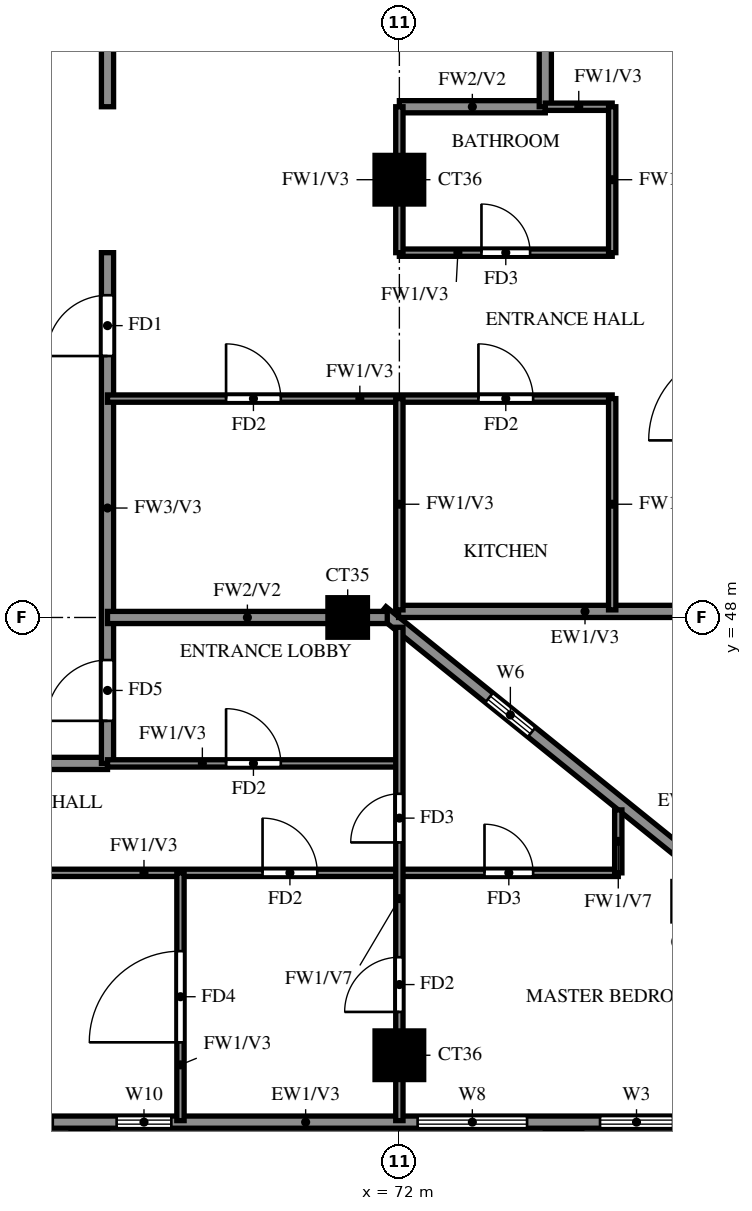
"""IFC4 building model, lengths in metres.
Left out: names, types, materials, properties, quantities, classifications, styles, units other than length and angle.
Written with IfcOpenShell. Run it as: python <this file> out.ifc"""

import sys

from ifc_helpers import new_model, si_unit, direction, frame, frame_2d, origin, origin_2d, place, context, subcontext, project, spatial, rectangle, extrude, source, transform, mapped, element, fill, save


model = new_model("IFC4")
c1 = context("Model", 3, precision=1e-05, world=origin(), true_north=direction((0.0, 1.0)))
c2 = subcontext(c1, "Body", "Model", "MODEL_VIEW")
j1 = project(units=[si_unit("LENGTHUNIT", "METRE"), si_unit("PLANEANGLEUNIT", "RADIAN")], contexts=[c1])
p1 = place(None, origin())
s1 = spatial("IfcSite", under=j1, at=p1, CompositionType="ELEMENT")
p2 = place(p1, origin())
s2 = spatial("IfcBuilding", under=s1, at=p2, CompositionType="ELEMENT")
p3 = place(p2, frame((0.0, 0.0, 246.5)))
s3 = spatial("IfcBuildingStorey", under=s2, at=p3, CompositionType="ELEMENT", Elevation=246.5)
m1 = source(origin(), c2, "Body", "SweptSolid", [
    extrude(rectangle(XDim=0.8, YDim=0.8, at=origin_2d()), origin(), (0.0, 0.0, 1.0), 3.22),
])
p4 = place(p3, frame((72.0, 40.8, 0.0), z_axis=(0.0, 0.0, 1.0), x_axis=(1.0, 0.0, 0.0)))
e1 = element("IfcColumn", 1, at=p4, inside=s3, PredefinedType="COLUMN", context=c2, shape_type="MappedRepresentation", body=[
    mapped(m1, transform((0.0, 0.0, 0.0))),
])
m2 = source(origin(), c2, "Body", "SweptSolid", [
    extrude(rectangle(XDim=0.65, YDim=0.65, at=origin_2d()), origin(), (0.0, 0.0, 1.0), 3.22),
])
for number, where, z_axis, x_axis in (
    (2, (76.823, 43.333, 0.0), (0.0, 0.0, 1.0), (1.0, 0.0, 0.0)),
    (3, (71.15, 48.0, 0.0), (0.0, 0.0, 1.0), (1.0, 0.0, 0.0)),
):
    element("IfcColumn", number, at=place(p3, frame(where, z_axis=z_axis, x_axis=x_axis)), inside=s3, PredefinedType="COLUMN", context=c2, shape_type="MappedRepresentation", body=[
        mapped(m2, transform((0.0, 0.0, 0.0))),
    ])
p5 = place(p3, frame((72.0, 55.2, 0.0), z_axis=(0.0, 0.0, 1.0), x_axis=(1.0, 0.0, 0.0)))
e4 = element("IfcColumn", 4, at=p5, inside=s3, PredefinedType="COLUMN", context=c2, shape_type="MappedRepresentation", body=[
    mapped(m1, transform((0.0, 0.0, 0.0))),
])
p6 = place(p3, frame((81.907, 39.87, 0.0), z_axis=(0.0, 0.0, 1.0), x_axis=(-0.777936274417, 0.62834318087, 0.0)))
e5 = element("IfcWall", 5, at=p6, inside=s3, PredefinedType="SOLIDWALL", context=c2, shape_type="SweptSolid", body=[
    extrude(rectangle(XDim=13.099, YDim=0.2, at=frame_2d((6.549, 0.0))), origin(), (0.0, 0.0, 1.0), 3.22),
])
p7 = place(p6, frame((9.938, 0.0, 1.5)))
e6 = element("IfcOpeningElement", 6, at=p7, cuts=e5, PredefinedType="OPENING", context=c2, shape_type="SweptSolid", body=[
    extrude(rectangle(XDim=0.9, YDim=0.9, at=frame_2d((0.45, 0.45))), frame((0.0, 0.11, 0.0), z_axis=(0.0, -1.0, 0.0), x_axis=(1.0, 0.0, 0.0)), (0.0, 0.0, 1.0), 0.22),
])
p8 = place(p3, frame((71.987, 48.1, 0.0), z_axis=(0.0, 0.0, 1.0), x_axis=(1.0, 0.0, 0.0)))
e7 = element("IfcWall", 7, at=p8, inside=s3, PredefinedType="SOLIDWALL", context=c2, shape_type="SweptSolid", body=[
    extrude(rectangle(XDim=6.813, YDim=0.2, at=frame_2d((3.406, 0.0))), origin(), (0.0, 0.0, 1.0), 3.22),
])
p9 = place(p3, frame((58.8, 39.7, 0.0), z_axis=(0.0, 0.0, 1.0), x_axis=(1.0, 0.0, 0.0)))
e8 = element("IfcWall", 8, at=p9, inside=s3, PredefinedType="SOLIDWALL", context=c2, shape_type="SweptSolid", body=[
    extrude(rectangle(XDim=23.317, YDim=0.2, at=frame_2d((11.658, 0.0))), origin(), (0.0, 0.0, 1.0), 3.22),
])
p10 = place(p9, frame((3.3, 0.0, 0.0)))
e9 = element("IfcOpeningElement", 9, at=p10, cuts=e8, PredefinedType="OPENING", context=c2, shape_type="SweptSolid", body=[
    extrude(rectangle(XDim=1.8, YDim=2.4, at=frame_2d((0.9, 1.2))), frame((0.0, 0.11, 0.0), z_axis=(0.0, -1.0, 0.0), x_axis=(1.0, 0.0, 0.0)), (0.0, 0.0, 1.0), 0.22),
])
p11 = place(p9, frame((18.3, 0.0, 0.0)))
e10 = element("IfcOpeningElement", 10, at=p11, cuts=e8, PredefinedType="OPENING", context=c2, shape_type="SweptSolid", body=[
    extrude(rectangle(XDim=1.8, YDim=2.4, at=frame_2d((0.9, 1.2))), frame((0.0, 0.11, 0.0), z_axis=(0.0, -1.0, 0.0), x_axis=(1.0, 0.0, 0.0)), (0.0, 0.0, 1.0), 0.22),
])
p12 = place(p9, frame((1.95, 0.0, 0.6)))
e11 = element("IfcOpeningElement", 11, at=p12, cuts=e8, PredefinedType="OPENING", context=c2, shape_type="SweptSolid", body=[
    extrude(rectangle(XDim=0.9, YDim=2.4, at=frame_2d((0.45, 1.2))), frame((0.0, 0.11, 0.0), z_axis=(0.0, -1.0, 0.0), x_axis=(1.0, 0.0, 0.0)), (0.0, 0.0, 1.0), 0.22),
])
p13 = place(p9, frame((5.7, 0.0, 0.6)))
e12 = element("IfcOpeningElement", 12, at=p13, cuts=e8, PredefinedType="OPENING", context=c2, shape_type="SweptSolid", body=[
    extrude(rectangle(XDim=1.8, YDim=2.4, at=frame_2d((0.9, 1.2))), frame((0.0, 0.11, 0.0), z_axis=(0.0, -1.0, 0.0), x_axis=(1.0, 0.0, 0.0)), (0.0, 0.0, 1.0), 0.22),
])
p14 = place(p9, frame((8.55, 0.0, 0.6)))
e13 = element("IfcOpeningElement", 13, at=p14, cuts=e8, PredefinedType="OPENING", context=c2, shape_type="SweptSolid", body=[
    extrude(rectangle(XDim=0.9, YDim=2.4, at=frame_2d((0.45, 1.2))), frame((0.0, 0.11, 0.0), z_axis=(0.0, -1.0, 0.0), x_axis=(1.0, 0.0, 0.0)), (0.0, 0.0, 1.0), 0.22),
])
p15 = place(p9, frame((13.5, 0.0, 0.6)))
e14 = element("IfcOpeningElement", 14, at=p15, cuts=e8, PredefinedType="OPENING", context=c2, shape_type="SweptSolid", body=[
    extrude(rectangle(XDim=1.8, YDim=2.4, at=frame_2d((0.9, 1.2))), frame((0.0, 0.11, 0.0), z_axis=(0.0, -1.0, 0.0), x_axis=(1.0, 0.0, 0.0)), (0.0, 0.0, 1.0), 0.22),
])
p16 = place(p9, frame((16.5, 0.0, 0.6)))
e15 = element("IfcOpeningElement", 15, at=p16, cuts=e8, PredefinedType="OPENING", context=c2, shape_type="SweptSolid", body=[
    extrude(rectangle(XDim=1.2, YDim=2.4, at=frame_2d((0.6, 1.2))), frame((0.0, 0.11, 0.0), z_axis=(0.0, -1.0, 0.0), x_axis=(1.0, 0.0, 0.0)), (0.0, 0.0, 1.0), 0.22),
])
p17 = place(p9, frame((20.7, 0.0, 0.6)))
e16 = element("IfcOpeningElement", 16, at=p17, cuts=e8, PredefinedType="OPENING", context=c2, shape_type="SweptSolid", body=[
    extrude(rectangle(XDim=1.2, YDim=2.4, at=frame_2d((0.6, 1.2))), frame((0.0, 0.11, 0.0), z_axis=(0.0, -1.0, 0.0), x_axis=(1.0, 0.0, 0.0)), (0.0, 0.0, 1.0), 0.22),
])
p18 = place(p3, frame((60.0, 45.6, 0.0), z_axis=(0.0, 0.0, 1.0), x_axis=(1.0, 0.0, 0.0)))
e17 = element("IfcWall", 17, at=p18, inside=s3, PredefinedType="SOLIDWALL", context=c2, shape_type="SweptSolid", body=[
    extrude(rectangle(XDim=7.2, YDim=0.2, at=frame_2d((3.6, 0.0))), origin(), (0.0, 0.0, 1.0), 3.22),
])
p19 = place(p3, frame((67.2, 45.6, 0.0), z_axis=(0.0, 0.0, 1.0), x_axis=(0.0, 1.0, 0.0)))
e18 = element("IfcWall", 18, at=p19, inside=s3, PredefinedType="SOLIDWALL", context=c2, shape_type="SweptSolid", body=[
    extrude(rectangle(XDim=8.4, YDim=0.2, at=frame_2d((4.2, 0.0))), origin(), (0.0, 0.0, 1.0), 3.22),
])
p20 = place(p19, frame((6.7, 0.0, 0.0)))
e19 = element("IfcOpeningElement", 19, at=p20, cuts=e18, PredefinedType="OPENING", context=c2, shape_type="SweptSolid", body=[
    extrude(rectangle(XDim=1.0, YDim=2.1, at=frame_2d((0.5, 1.05))), frame((0.0, 0.11, 0.0), z_axis=(0.0, -1.0, 0.0), x_axis=(1.0, 0.0, 0.0)), (0.0, 0.0, 1.0), 0.22),
])
p21 = place(p19, frame((0.7, 0.0, 0.0)))
e20 = element("IfcOpeningElement", 20, at=p21, cuts=e18, PredefinedType="OPENING", context=c2, shape_type="SweptSolid", body=[
    extrude(rectangle(XDim=1.0, YDim=2.1, at=frame_2d((0.5, 1.05))), frame((0.0, 0.11, 0.0), z_axis=(0.0, -1.0, 0.0), x_axis=(1.0, 0.0, 0.0)), (0.0, 0.0, 1.0), 0.22),
])
p22 = place(p3, frame((67.2, 56.4, 0.0), z_axis=(0.0, 0.0, 1.0), x_axis=(0.0, 1.0, 0.0)))
e21 = element("IfcWall", 21, at=p22, inside=s3, PredefinedType="SOLIDWALL", context=c2, shape_type="SweptSolid", body=[
    extrude(rectangle(XDim=6.0, YDim=0.2, at=frame_2d((3.0, 0.0))), origin(), (0.0, 0.0, 1.0), 3.22),
])
p23 = place(p22, frame((3.7, 0.0, 0.0)))
e22 = element("IfcOpeningElement", 22, at=p23, cuts=e21, PredefinedType="OPENING", context=c2, shape_type="SweptSolid", body=[
    extrude(rectangle(XDim=1.0, YDim=2.1, at=frame_2d((0.5, 1.05))), frame((0.0, 0.11, 0.0), z_axis=(0.0, -1.0, 0.0), x_axis=(1.0, 0.0, 0.0)), (0.0, 0.0, 1.0), 0.22),
])
p24 = place(p3, frame((67.2, 48.0, 0.0), z_axis=(0.0, 0.0, 1.0), x_axis=(1.0, 0.0, 0.0)))
e23 = element("IfcWall", 23, at=p24, inside=s3, PredefinedType="SOLIDWALL", context=c2, shape_type="SweptSolid", body=[
    extrude(rectangle(XDim=4.601, YDim=0.2, at=frame_2d((2.301, 0.0))), origin(), (0.0, 0.0, 1.0), 3.22),
])
p25 = place(p3, frame((72.0, 56.4, 0.0), z_axis=(0.0, 0.0, 1.0), x_axis=(1.0, 0.0, 0.0)))
e24 = element("IfcWall", 24, at=p25, inside=s3, PredefinedType="SOLIDWALL", context=c2, shape_type="SweptSolid", body=[
    extrude(rectangle(XDim=2.4, YDim=0.2, at=frame_2d((1.2, 0.0))), origin(), (0.0, 0.0, 1.0), 3.22),
])
p26 = place(p3, frame((74.4, 56.4, 0.0), z_axis=(0.0, 0.0, 1.0), x_axis=(0.0, 1.0, 0.0)))
e25 = element("IfcWall", 25, at=p26, inside=s3, PredefinedType="SOLIDWALL", context=c2, shape_type="SweptSolid", body=[
    extrude(rectangle(XDim=2.4, YDim=0.2, at=frame_2d((1.2, 0.0))), origin(), (0.0, 0.0, 1.0), 3.22),
])
p27 = place(p3, frame((60.0, 43.8, 0.0), z_axis=(0.0, 0.0, 1.0), x_axis=(1.0, 0.0, 0.0)))
e26 = element("IfcWall", 26, at=p27, inside=s3, PredefinedType="PARTITIONING", context=c2, shape_type="SweptSolid", body=[
    extrude(rectangle(XDim=15.6, YDim=0.12, at=frame_2d((7.8, 0.0))), origin(), (0.0, 0.0, 1.0), 3.22),
])
p28 = place(p27, frame((9.75, 0.0, 0.0)))
e27 = element("IfcOpeningElement", 27, at=p28, cuts=e26, PredefinedType="OPENING", context=c2, shape_type="SweptSolid", body=[
    extrude(rectangle(XDim=0.9, YDim=2.1, at=frame_2d((0.45, 1.05))), frame((0.0, 0.07, 0.0), z_axis=(0.0, -1.0, 0.0), x_axis=(1.0, 0.0, 0.0)), (0.0, 0.0, 1.0), 0.14),
])
p29 = place(p27, frame((3.45, 0.0, 0.0)))
e28 = element("IfcOpeningElement", 28, at=p29, cuts=e26, PredefinedType="OPENING", context=c2, shape_type="SweptSolid", body=[
    extrude(rectangle(XDim=1.5, YDim=2.1, at=frame_2d((0.75, 1.05))), frame((0.0, 0.07, 0.0), z_axis=(0.0, -1.0, 0.0), x_axis=(1.0, 0.0, 0.0)), (0.0, 0.0, 1.0), 0.14),
])
p30 = place(p27, frame((13.4, 0.0, 0.0)))
e29 = element("IfcOpeningElement", 29, at=p30, cuts=e26, PredefinedType="OPENING", context=c2, shape_type="SweptSolid", body=[
    extrude(rectangle(XDim=0.8, YDim=2.1, at=frame_2d((0.4, 1.05))), frame((0.0, 0.07, 0.0), z_axis=(0.0, -1.0, 0.0), x_axis=(1.0, 0.0, 0.0)), (0.0, 0.0, 1.0), 0.14),
])
p31 = place(p3, frame((67.2, 45.6, 0.0), z_axis=(0.0, 0.0, 1.0), x_axis=(1.0, 0.0, 0.0)))
e30 = element("IfcWall", 30, at=p31, inside=s3, PredefinedType="PARTITIONING", context=c2, shape_type="SweptSolid", body=[
    extrude(rectangle(XDim=4.8, YDim=0.12, at=frame_2d((2.4, 0.0))), origin(), (0.0, 0.0, 1.0), 3.22),
])
p32 = place(p31, frame((1.95, 0.0, 0.0)))
e31 = element("IfcOpeningElement", 31, at=p32, cuts=e30, PredefinedType="OPENING", context=c2, shape_type="SweptSolid", body=[
    extrude(rectangle(XDim=0.9, YDim=2.1, at=frame_2d((0.45, 1.05))), frame((0.0, 0.07, 0.0), z_axis=(0.0, -1.0, 0.0), x_axis=(1.0, 0.0, 0.0)), (0.0, 0.0, 1.0), 0.14),
])
p33 = place(p3, frame((67.2, 51.6, 0.0), z_axis=(0.0, 0.0, 1.0), x_axis=(1.0, 0.0, 0.0)))
e32 = element("IfcWall", 32, at=p33, inside=s3, PredefinedType="PARTITIONING", context=c2, shape_type="SweptSolid", body=[
    extrude(rectangle(XDim=8.3, YDim=0.12, at=frame_2d((4.15, 0.0))), origin(), (0.0, 0.0, 1.0), 3.22),
])
p34 = place(p33, frame((6.1, 0.0, 0.0)))
e33 = element("IfcOpeningElement", 33, at=p34, cuts=e32, PredefinedType="OPENING", context=c2, shape_type="SweptSolid", body=[
    extrude(rectangle(XDim=0.9, YDim=2.1, at=frame_2d((0.45, 1.05))), frame((0.0, 0.07, 0.0), z_axis=(0.0, -1.0, 0.0), x_axis=(1.0, 0.0, 0.0)), (0.0, 0.0, 1.0), 0.14),
])
p35 = place(p33, frame((1.95, 0.0, 0.0)))
e34 = element("IfcOpeningElement", 34, at=p35, cuts=e32, PredefinedType="OPENING", context=c2, shape_type="SweptSolid", body=[
    extrude(rectangle(XDim=0.9, YDim=2.1, at=frame_2d((0.45, 1.05))), frame((0.0, 0.07, 0.0), z_axis=(0.0, -1.0, 0.0), x_axis=(1.0, 0.0, 0.0)), (0.0, 0.0, 1.0), 0.14),
])
p36 = place(p3, frame((72.0, 54.0, 0.0), z_axis=(0.0, 0.0, 1.0), x_axis=(1.0, 0.0, 0.0)))
e35 = element("IfcWall", 35, at=p36, inside=s3, PredefinedType="PARTITIONING", context=c2, shape_type="SweptSolid", body=[
    extrude(rectangle(XDim=3.5, YDim=0.12, at=frame_2d((1.75, 0.0))), origin(), (0.0, 0.0, 1.0), 3.22),
])
p37 = place(p36, frame((1.35, 0.0, 0.0)))
e36 = element("IfcOpeningElement", 36, at=p37, cuts=e35, PredefinedType="OPENING", context=c2, shape_type="SweptSolid", body=[
    extrude(rectangle(XDim=0.8, YDim=2.1, at=frame_2d((0.4, 1.05))), frame((0.0, 0.07, 0.0), z_axis=(0.0, -1.0, 0.0), x_axis=(1.0, 0.0, 0.0)), (0.0, 0.0, 1.0), 0.14),
])
p38 = place(p3, frame((74.4, 56.4, 0.0), z_axis=(0.0, 0.0, 1.0), x_axis=(1.0, 0.0, 0.0)))
e37 = element("IfcWall", 37, at=p38, inside=s3, PredefinedType="PARTITIONING", context=c2, shape_type="SweptSolid", body=[
    extrude(rectangle(XDim=1.1, YDim=0.12, at=frame_2d((0.55, 0.0))), origin(), (0.0, 0.0, 1.0), 3.22),
])
p39 = place(p3, frame((68.4, 39.725, 0.0), z_axis=(0.0, 0.0, 1.0), x_axis=(0.0, 1.0, 0.0)))
e38 = element("IfcWall", 38, at=p39, inside=s3, PredefinedType="PARTITIONING", context=c2, shape_type="SweptSolid", body=[
    extrude(rectangle(XDim=4.075, YDim=0.12, at=frame_2d((2.038, 0.0))), origin(), (0.0, 0.0, 1.0), 3.22),
])
p40 = place(p39, frame((1.288, 0.0, 0.0)))
e39 = element("IfcOpeningElement", 39, at=p40, cuts=e38, PredefinedType="OPENING", context=c2, shape_type="SweptSolid", body=[
    extrude(rectangle(XDim=1.5, YDim=2.1, at=frame_2d((0.75, 1.05))), frame((0.0, 0.07, 0.0), z_axis=(0.0, -1.0, 0.0), x_axis=(1.0, 0.0, 0.0)), (0.0, 0.0, 1.0), 0.14),
])
p41 = place(p3, frame((72.0, 39.725, 0.0), z_axis=(0.0, 0.0, 1.0), x_axis=(0.0, 1.0, 0.0)))
e40 = element("IfcWall", 40, at=p41, inside=s3, PredefinedType="PARTITIONING", context=c2, shape_type="SweptSolid", body=[
    extrude(rectangle(XDim=8.114, YDim=0.12, at=frame_2d((4.057, 0.0))), origin(), (0.0, 0.0, 1.0), 2.32),
])
p42 = place(p41, frame((1.788, 0.0, 0.0)))
e41 = element("IfcOpeningElement", 41, at=p42, cuts=e40, PredefinedType="OPENING", context=c2, shape_type="SweptSolid", body=[
    extrude(rectangle(XDim=0.9, YDim=2.1, at=frame_2d((0.45, 1.05))), frame((0.0, 0.07, 0.0), z_axis=(0.0, -1.0, 0.0), x_axis=(1.0, 0.0, 0.0)), (0.0, 0.0, 1.0), 0.14),
])
p43 = place(p41, frame((4.575, 0.0, 0.0)))
e42 = element("IfcOpeningElement", 42, at=p43, cuts=e40, PredefinedType="OPENING", context=c2, shape_type="SweptSolid", body=[
    extrude(rectangle(XDim=0.8, YDim=2.1, at=frame_2d((0.4, 1.05))), frame((0.0, 0.07, 0.0), z_axis=(0.0, -1.0, 0.0), x_axis=(1.0, 0.0, 0.0)), (0.0, 0.0, 1.0), 0.14),
])
p44 = place(p3, frame((72.0, 48.125, 0.0), z_axis=(0.0, 0.0, 1.0), x_axis=(0.0, 1.0, 0.0)))
e43 = element("IfcWall", 43, at=p44, inside=s3, PredefinedType="PARTITIONING", context=c2, shape_type="SweptSolid", body=[
    extrude(rectangle(XDim=3.475, YDim=0.12, at=frame_2d((1.738, 0.0))), origin(), (0.0, 0.0, 1.0), 3.22),
])
p45 = place(p3, frame((72.0, 54.0, 0.0), z_axis=(0.0, 0.0, 1.0), x_axis=(0.0, 1.0, 0.0)))
e44 = element("IfcWall", 44, at=p45, inside=s3, PredefinedType="PARTITIONING", context=c2, shape_type="SweptSolid", body=[
    extrude(rectangle(XDim=2.4, YDim=0.12, at=frame_2d((1.2, 0.0))), origin(), (0.0, 0.0, 1.0), 3.22),
])
p46 = place(p3, frame((75.5, 48.125, 0.0), z_axis=(0.0, 0.0, 1.0), x_axis=(0.0, 1.0, 0.0)))
e45 = element("IfcWall", 45, at=p46, inside=s3, PredefinedType="PARTITIONING", context=c2, shape_type="SweptSolid", body=[
    extrude(rectangle(XDim=3.475, YDim=0.12, at=frame_2d((1.738, 0.0))), origin(), (0.0, 0.0, 1.0), 3.22),
])
p47 = place(p3, frame((75.5, 54.0, 0.0), z_axis=(0.0, 0.0, 1.0), x_axis=(0.0, 1.0, 0.0)))
e46 = element("IfcWall", 46, at=p47, inside=s3, PredefinedType="PARTITIONING", context=c2, shape_type="SweptSolid", body=[
    extrude(rectangle(XDim=2.4, YDim=0.12, at=frame_2d((1.2, 0.0))), origin(), (0.0, 0.0, 1.0), 3.22),
])
p48 = place(p3, frame((75.6, 43.8, 0.0), z_axis=(0.0, 0.0, 1.0), x_axis=(0.0, 1.0, 0.0)))
e47 = element("IfcWall", 47, at=p48, inside=s3, PredefinedType="PARTITIONING", context=c2, shape_type="SweptSolid", body=[
    extrude(rectangle(XDim=1.035, YDim=0.12, at=frame_2d((0.518, 0.0))), origin(), (0.0, 0.0, 1.0), 2.32),
])
p49 = place(p7, origin())
e48 = element("IfcWindow", 48, at=p49, inside=s3, PartitioningType="SINGLE_PANEL", PredefinedType="WINDOW", context=c2, shape_type="SweptSolid", body=[
    extrude(rectangle(XDim=0.9, YDim=0.9, at=frame_2d((0.45, 0.45))), frame((0.0, 0.03, 0.0), z_axis=(0.0, -1.0, 0.0), x_axis=(1.0, 0.0, 0.0)), (0.0, 0.0, 1.0), 0.06),
])
fill(e6, e48)
p50 = place(p14, origin())
e49 = element("IfcWindow", 49, at=p50, inside=s3, PartitioningType="SINGLE_PANEL", PredefinedType="WINDOW", context=c2, shape_type="SweptSolid", body=[
    extrude(rectangle(XDim=0.9, YDim=2.4, at=frame_2d((0.45, 1.2))), frame((0.0, 0.03, 0.0), z_axis=(0.0, -1.0, 0.0), x_axis=(1.0, 0.0, 0.0)), (0.0, 0.0, 1.0), 0.06),
])
fill(e13, e49)
p51 = place(p15, origin())
e50 = element("IfcWindow", 50, at=p51, inside=s3, PartitioningType="DOUBLE_PANEL_VERTICAL", PredefinedType="WINDOW", context=c2, shape_type="SweptSolid", body=[
    extrude(rectangle(XDim=1.8, YDim=2.4, at=frame_2d((0.9, 1.2))), frame((0.0, 0.03, 0.0), z_axis=(0.0, -1.0, 0.0), x_axis=(1.0, 0.0, 0.0)), (0.0, 0.0, 1.0), 0.06),
])
fill(e14, e50)
p52 = place(p16, origin())
e51 = element("IfcWindow", 51, at=p52, inside=s3, PartitioningType="SINGLE_PANEL", PredefinedType="WINDOW", context=c2, shape_type="SweptSolid", body=[
    extrude(rectangle(XDim=1.2, YDim=2.4, at=frame_2d((0.6, 1.2))), frame((0.0, 0.03, 0.0), z_axis=(0.0, -1.0, 0.0), x_axis=(1.0, 0.0, 0.0)), (0.0, 0.0, 1.0), 0.06),
])
fill(e15, e51)
p53 = place(p20, origin())
e52 = element("IfcDoor", 52, at=p53, inside=s3, OperationType="SINGLE_SWING_LEFT", PredefinedType="DOOR", context=c2, shape_type="SweptSolid", body=[
    extrude(rectangle(XDim=1.0, YDim=2.1, at=frame_2d((0.5, 1.05))), frame((0.0, 0.025, 0.0), z_axis=(0.0, -1.0, 0.0), x_axis=(1.0, 0.0, 0.0)), (0.0, 0.0, 1.0), 0.05),
])
fill(e19, e52)
p54 = place(p34, origin())
e53 = element("IfcDoor", 53, at=p54, inside=s3, OperationType="SINGLE_SWING_LEFT", PredefinedType="DOOR", context=c2, shape_type="SweptSolid", body=[
    extrude(rectangle(XDim=0.9, YDim=2.1, at=frame_2d((0.45, 1.05))), frame((0.0, 0.025, 0.0), z_axis=(0.0, -1.0, 0.0), x_axis=(1.0, 0.0, 0.0)), (0.0, 0.0, 1.0), 0.05),
])
fill(e33, e53)
p55 = place(p37, origin())
e54 = element("IfcDoor", 54, at=p55, inside=s3, OperationType="SINGLE_SWING_LEFT", PredefinedType="DOOR", context=c2, shape_type="SweptSolid", body=[
    extrude(rectangle(XDim=0.8, YDim=2.1, at=frame_2d((0.4, 1.05))), frame((0.0, 0.025, 0.0), z_axis=(0.0, -1.0, 0.0), x_axis=(1.0, 0.0, 0.0)), (0.0, 0.0, 1.0), 0.05),
])
fill(e36, e54)
p56 = place(p35, origin())
e55 = element("IfcDoor", 55, at=p56, inside=s3, OperationType="SINGLE_SWING_RIGHT", PredefinedType="DOOR", context=c2, shape_type="SweptSolid", body=[
    extrude(rectangle(XDim=0.9, YDim=2.1, at=frame_2d((0.45, 1.05))), frame((0.0, 0.025, 0.0), z_axis=(0.0, -1.0, 0.0), x_axis=(1.0, 0.0, 0.0)), (0.0, 0.0, 1.0), 0.05),
])
fill(e34, e55)
p57 = place(p40, origin())
e56 = element("IfcDoor", 56, at=p57, inside=s3, OperationType="SINGLE_SWING_RIGHT", PredefinedType="DOOR", context=c2, shape_type="SweptSolid", body=[
    extrude(rectangle(XDim=1.5, YDim=2.1, at=frame_2d((0.75, 1.05))), frame((0.0, 0.025, 0.0), z_axis=(0.0, -1.0, 0.0), x_axis=(1.0, 0.0, 0.0)), (0.0, 0.0, 1.0), 0.05),
])
fill(e39, e56)
p58 = place(p32, origin())
e57 = element("IfcDoor", 57, at=p58, inside=s3, OperationType="SINGLE_SWING_LEFT", PredefinedType="DOOR", context=c2, shape_type="SweptSolid", body=[
    extrude(rectangle(XDim=0.9, YDim=2.1, at=frame_2d((0.45, 1.05))), frame((0.0, 0.025, 0.0), z_axis=(0.0, -1.0, 0.0), x_axis=(1.0, 0.0, 0.0)), (0.0, 0.0, 1.0), 0.05),
])
fill(e31, e57)
p59 = place(p21, origin())
e58 = element("IfcDoor", 58, at=p59, inside=s3, OperationType="SINGLE_SWING_LEFT", PredefinedType="DOOR", context=c2, shape_type="SweptSolid", body=[
    extrude(rectangle(XDim=1.0, YDim=2.1, at=frame_2d((0.5, 1.05))), frame((0.0, 0.025, 0.0), z_axis=(0.0, -1.0, 0.0), x_axis=(1.0, 0.0, 0.0)), (0.0, 0.0, 1.0), 0.05),
])
fill(e20, e58)
p60 = place(p28, origin())
e59 = element("IfcDoor", 59, at=p60, inside=s3, OperationType="SINGLE_SWING_RIGHT", PredefinedType="DOOR", context=c2, shape_type="SweptSolid", body=[
    extrude(rectangle(XDim=0.9, YDim=2.1, at=frame_2d((0.45, 1.05))), frame((0.0, 0.025, 0.0), z_axis=(0.0, -1.0, 0.0), x_axis=(1.0, 0.0, 0.0)), (0.0, 0.0, 1.0), 0.05),
])
fill(e27, e59)
p61 = place(p42, origin())
e60 = element("IfcDoor", 60, at=p61, inside=s3, OperationType="SINGLE_SWING_RIGHT", PredefinedType="DOOR", context=c2, shape_type="SweptSolid", body=[
    extrude(rectangle(XDim=0.9, YDim=2.1, at=frame_2d((0.45, 1.05))), frame((0.0, 0.025, 0.0), z_axis=(0.0, -1.0, 0.0), x_axis=(1.0, 0.0, 0.0)), (0.0, 0.0, 1.0), 0.05),
])
fill(e41, e60)
p62 = place(p43, origin())
e61 = element("IfcDoor", 61, at=p62, inside=s3, OperationType="SINGLE_SWING_RIGHT", PredefinedType="DOOR", context=c2, shape_type="SweptSolid", body=[
    extrude(rectangle(XDim=0.8, YDim=2.1, at=frame_2d((0.4, 1.05))), frame((0.0, 0.025, 0.0), z_axis=(0.0, -1.0, 0.0), x_axis=(1.0, 0.0, 0.0)), (0.0, 0.0, 1.0), 0.05),
])
fill(e42, e61)
p63 = place(p30, origin())
e62 = element("IfcDoor", 62, at=p63, inside=s3, OperationType="SINGLE_SWING_LEFT", PredefinedType="DOOR", context=c2, shape_type="SweptSolid", body=[
    extrude(rectangle(XDim=0.8, YDim=2.1, at=frame_2d((0.4, 1.05))), frame((0.0, 0.025, 0.0), z_axis=(0.0, -1.0, 0.0), x_axis=(1.0, 0.0, 0.0)), (0.0, 0.0, 1.0), 0.05),
])
fill(e29, e62)
save(model, sys.argv[1])
